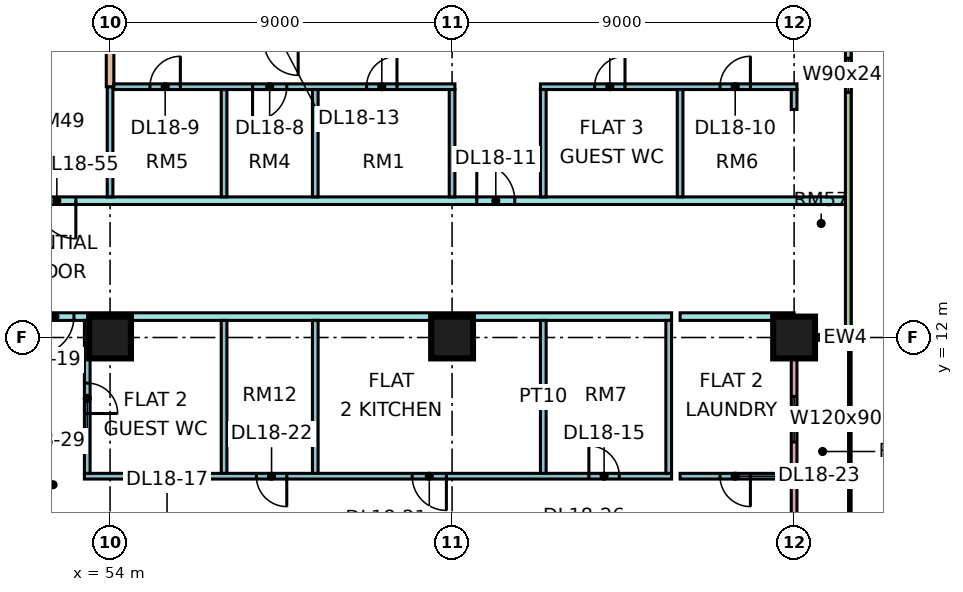
"""IFC4 building model, lengths in metres.
Left out: names, types, materials, properties, quantities, classifications, styles, units other than length and angle.
Written with IfcOpenShell. Run it as: python <this file> out.ifc"""

import sys

from ifc_helpers import new_model, si_unit, direction, frame, frame_2d, origin, origin_2d, place, context, subcontext, project, spatial, rectangle, extrude, element, fill, save


model = new_model("IFC4")
c1 = context("Model", 3, precision=1e-05, world=origin(), true_north=direction((0.0, 1.0)))
c2 = subcontext(c1, "Body", "Model", "MODEL_VIEW")
j1 = project(units=[si_unit("LENGTHUNIT", "METRE"), si_unit("PLANEANGLEUNIT", "RADIAN")], contexts=[c1])
p1 = place(None, origin())
s1 = spatial("IfcSite", under=j1, at=p1, CompositionType="ELEMENT")
p2 = place(p1, origin())
s2 = spatial("IfcBuilding", under=s1, at=p2, CompositionType="ELEMENT")
p3 = place(p2, frame((0.0, 0.0, 82.65)))
s3 = spatial("IfcBuildingStorey", under=s2, at=p3, CompositionType="ELEMENT", Elevation=82.65)
for number, where, z_axis, x_axis in (
    (1, (54.0, 12.0, 0.0), (0.0, 0.0, 1.0), (1.0, 0.0, 0.0)),
    (2, (63.0, 12.0, 0.0), (0.0, 0.0, 1.0), (1.0, 0.0, 0.0)),
    (3, (72.0, 12.0, 0.0), (0.0, 0.0, 1.0), (1.0, 0.0, 0.0)),
):
    element("IfcColumn", number, at=place(p3, frame(where, z_axis=z_axis, x_axis=x_axis)), inside=s3, PredefinedType="COLUMN", context=c2, shape_type="SweptSolid", body=[
        extrude(rectangle(XDim=1.1, YDim=1.1, at=origin_2d()), origin(), (0.0, 0.0, 1.0), 3.75),
    ])
p4 = place(p3, frame((72.0, 1.575, 0.0), z_axis=(0.0, 0.0, 1.0), x_axis=(0.0, 1.0, 0.0)))
e4 = element("IfcWall", 4, at=p4, inside=s3, PredefinedType="SOLIDWALL", context=c2, shape_type="SweptSolid", body=[
    extrude(rectangle(XDim=10.35, YDim=0.15, at=frame_2d((5.175, 0.0))), origin(), (0.0, 0.0, 1.0), 3.3),
])
p5 = place(p4, frame((1.887, 0.0, 0.0)))
e5 = element("IfcOpeningElement", 5, at=p5, cuts=e4, PredefinedType="OPENING", context=c2, shape_type="SweptSolid", body=[
    extrude(rectangle(XDim=1.8, YDim=2.4, at=frame_2d((0.9, 1.2))), frame((0.0, 0.085, 0.0), z_axis=(0.0, -1.0, 0.0), x_axis=(1.0, 0.0, 0.0)), (0.0, 0.0, 1.0), 0.17),
])
p6 = place(p4, frame((7.675, 0.0, 1.7)))
e6 = element("IfcOpeningElement", 6, at=p6, cuts=e4, PredefinedType="OPENING", context=c2, shape_type="SweptSolid", body=[
    extrude(rectangle(XDim=1.2, YDim=0.9, at=frame_2d((0.6, 0.45))), frame((0.0, 0.085, 0.0), z_axis=(0.0, -1.0, 0.0), x_axis=(1.0, 0.0, 0.0)), (0.0, 0.0, 1.0), 0.17),
])
p7 = place(p3, frame((73.5, 12.0, 0.0), z_axis=(0.0, 0.0, 1.0), x_axis=(-1.0, 0.0, 0.0)))
e7 = element("IfcWall", 7, at=p7, inside=s3, PredefinedType="SOLIDWALL", context=c2, shape_type="SweptSolid", body=[
    extrude(rectangle(XDim=1.5, YDim=0.15, at=frame_2d((0.75, 0.0))), origin(), (0.0, 0.0, 1.0), 3.3),
])
p8 = place(p3, frame((73.425, 12.075, 0.0), z_axis=(0.0, 0.0, 1.0), x_axis=(0.0, 1.0, 0.0)))
e8 = element("IfcWall", 8, at=p8, inside=s3, PredefinedType="SOLIDWALL", context=c2, shape_type="SweptSolid", body=[
    extrude(rectangle(XDim=10.425, YDim=0.15, at=frame_2d((5.212, 0.0))), origin(), (0.0, 0.0, 1.0), 3.3),
])
p9 = place(p8, frame((6.375, 0.0, 0.45)))
e9 = element("IfcOpeningElement", 9, at=p9, cuts=e8, PredefinedType="OPENING", context=c2, shape_type="SweptSolid", body=[
    extrude(rectangle(XDim=0.9, YDim=2.4, at=frame_2d((0.45, 1.2))), frame((0.0, 0.085, 0.0), z_axis=(0.0, -1.0, 0.0), x_axis=(1.0, 0.0, 0.0)), (0.0, 0.0, 1.0), 0.17),
])
p10 = place(p8, frame((8.175, 0.0, 0.45)))
e10 = element("IfcOpeningElement", 10, at=p10, cuts=e8, PredefinedType="OPENING", context=c2, shape_type="SweptSolid", body=[
    extrude(rectangle(XDim=1.8, YDim=2.4, at=frame_2d((0.9, 1.2))), frame((0.0, 0.085, 0.0), z_axis=(0.0, -1.0, 0.0), x_axis=(1.0, 0.0, 0.0)), (0.0, 0.0, 1.0), 0.17),
])
p11 = place(p3, frame((40.65, 12.55, 0.0), z_axis=(0.0, 0.0, 1.0), x_axis=(1.0, 0.0, 0.0)))
e11 = element("IfcWall", 11, at=p11, inside=s3, PredefinedType="PARTITIONING", context=c2, shape_type="SweptSolid", body=[
    extrude(rectangle(XDim=28.125, YDim=0.2, at=frame_2d((14.062, 0.0))), origin(), (0.0, 0.0, 1.0), 3.3),
])
p12 = place(p11, frame((11.4, 0.0, 0.0)))
e12 = element("IfcOpeningElement", 12, at=p12, cuts=e11, PredefinedType="OPENING", context=c2, shape_type="SweptSolid", body=[
    extrude(rectangle(XDim=1.0, YDim=2.1, at=frame_2d((0.5, 1.05))), frame((0.0, 0.11, 0.0), z_axis=(0.0, -1.0, 0.0), x_axis=(1.0, 0.0, 0.0)), (0.0, 0.0, 1.0), 0.22),
])
p13 = place(p11, frame((1.05, 0.0, 0.0)))
e13 = element("IfcOpeningElement", 13, at=p13, cuts=e11, PredefinedType="OPENING", context=c2, shape_type="SweptSolid", body=[
    extrude(rectangle(XDim=1.0, YDim=2.1, at=frame_2d((0.5, 1.05))), frame((0.0, 0.11, 0.0), z_axis=(0.0, -1.0, 0.0), x_axis=(1.0, 0.0, 0.0)), (0.0, 0.0, 1.0), 0.22),
])
p14 = place(p3, frame((51.225, 15.6, 0.0), z_axis=(0.0, 0.0, 1.0), x_axis=(1.0, 0.0, 0.0)))
e14 = element("IfcWall", 14, at=p14, inside=s3, PredefinedType="PARTITIONING", context=c2, shape_type="SweptSolid", body=[
    extrude(rectangle(XDim=22.125, YDim=0.2, at=frame_2d((11.062, 0.0))), origin(), (0.0, 0.0, 1.0), 3.3),
])
p15 = place(p14, frame((12.425, 0.0, 0.0)))
e15 = element("IfcOpeningElement", 15, at=p15, cuts=e14, PredefinedType="OPENING", context=c2, shape_type="SweptSolid", body=[
    extrude(rectangle(XDim=1.0, YDim=2.1, at=frame_2d((0.5, 1.05))), frame((0.0, 0.11, 0.0), z_axis=(0.0, -1.0, 0.0), x_axis=(1.0, 0.0, 0.0)), (0.0, 0.0, 1.0), 0.22),
])
p16 = place(p14, frame((0.875, 0.0, 0.0)))
e16 = element("IfcOpeningElement", 16, at=p16, cuts=e14, PredefinedType="OPENING", context=c2, shape_type="SweptSolid", body=[
    extrude(rectangle(XDim=1.0, YDim=2.1, at=frame_2d((0.5, 1.05))), frame((0.0, 0.11, 0.0), z_axis=(0.0, -1.0, 0.0), x_axis=(1.0, 0.0, 0.0)), (0.0, 0.0, 1.0), 0.22),
])
p17 = place(p3, frame((53.325, 8.35, 0.0), z_axis=(0.0, 0.0, 1.0), x_axis=(1.0, 0.0, 0.0)))
e17 = element("IfcWall", 17, at=p17, inside=s3, PredefinedType="PARTITIONING", context=c2, shape_type="SweptSolid", body=[
    extrude(rectangle(XDim=15.45, YDim=0.15, at=frame_2d((7.725, 0.0))), origin(), (0.0, 0.0, 1.0), 3.3),
])
p18 = place(p17, frame((13.275, 0.0, 0.0)))
e18 = element("IfcOpeningElement", 18, at=p18, cuts=e17, PredefinedType="OPENING", context=c2, shape_type="SweptSolid", body=[
    extrude(rectangle(XDim=0.8, YDim=2.1, at=frame_2d((0.4, 1.05))), frame((0.0, 0.085, 0.0), z_axis=(0.0, -1.0, 0.0), x_axis=(1.0, 0.0, 0.0)), (0.0, 0.0, 1.0), 0.17),
])
p19 = place(p17, frame((8.625, 0.0, 0.0)))
e19 = element("IfcOpeningElement", 19, at=p19, cuts=e17, PredefinedType="OPENING", context=c2, shape_type="SweptSolid", body=[
    extrude(rectangle(XDim=0.9, YDim=2.1, at=frame_2d((0.45, 1.05))), frame((0.0, 0.085, 0.0), z_axis=(0.0, -1.0, 0.0), x_axis=(1.0, 0.0, 0.0)), (0.0, 0.0, 1.0), 0.17),
])
p20 = place(p17, frame((4.525, 0.0, 0.0)))
e20 = element("IfcOpeningElement", 20, at=p20, cuts=e17, PredefinedType="OPENING", context=c2, shape_type="SweptSolid", body=[
    extrude(rectangle(XDim=0.8, YDim=2.1, at=frame_2d((0.4, 1.05))), frame((0.0, 0.085, 0.0), z_axis=(0.0, -1.0, 0.0), x_axis=(1.0, 0.0, 0.0)), (0.0, 0.0, 1.0), 0.17),
])
p21 = place(p3, frame((53.4, 8.425, 0.0), z_axis=(0.0, 0.0, 1.0), x_axis=(0.0, 1.0, 0.0)))
e21 = element("IfcWall", 21, at=p21, inside=s3, PredefinedType="PARTITIONING", context=c2, shape_type="SweptSolid", body=[
    extrude(rectangle(XDim=4.025, YDim=0.15, at=frame_2d((2.012, 0.0))), origin(), (0.0, 0.0, 1.0), 3.3),
])
p22 = place(p21, frame((1.575, 0.0, 0.0)))
e22 = element("IfcOpeningElement", 22, at=p22, cuts=e21, PredefinedType="OPENING", context=c2, shape_type="SweptSolid", body=[
    extrude(rectangle(XDim=0.8, YDim=2.1, at=frame_2d((0.4, 1.05))), frame((0.0, 0.085, 0.0), z_axis=(0.0, -1.0, 0.0), x_axis=(1.0, 0.0, 0.0)), (0.0, 0.0, 1.0), 0.17),
])
p23 = place(p3, frame((54.0, 15.7, 0.0), z_axis=(0.0, 0.0, 1.0), x_axis=(0.0, 1.0, 0.0)))
e23 = element("IfcWall", 23, at=p23, inside=s3, PredefinedType="PARTITIONING", context=c2, shape_type="SweptSolid", body=[
    extrude(rectangle(XDim=2.9, YDim=0.15, at=frame_2d((1.45, 0.0))), origin(), (0.0, 0.0, 1.0), 3.3),
])
p24 = place(p3, frame((54.0, 18.6, 0.0), z_axis=(0.0, 0.0, 1.0), x_axis=(0.0, 1.0, 0.0)))
e24 = element("IfcWall", 24, at=p24, inside=s3, PredefinedType="PARTITIONING", context=c2, shape_type="SweptSolid", body=[
    extrude(rectangle(XDim=5.326, YDim=0.2, at=frame_2d((2.663, 0.0))), origin(), (0.0, 0.0, 1.0), 3.3),
])
p25 = place(p3, frame((54.1, 18.6, 0.0), z_axis=(0.0, 0.0, 1.0), x_axis=(1.0, 0.0, 0.0)))
e25 = element("IfcWall", 25, at=p25, inside=s3, PredefinedType="PARTITIONING", context=c2, shape_type="SweptSolid", body=[
    extrude(rectangle(XDim=8.975, YDim=0.15, at=frame_2d((4.487, 0.0))), origin(), (0.0, 0.0, 1.0), 3.3),
])
p26 = place(p25, frame((6.65, 0.0, 0.0)))
e26 = element("IfcOpeningElement", 26, at=p26, cuts=e25, PredefinedType="OPENING", context=c2, shape_type="SweptSolid", body=[
    extrude(rectangle(XDim=0.8, YDim=2.1, at=frame_2d((0.4, 1.05))), frame((0.0, 0.085, 0.0), z_axis=(0.0, -1.0, 0.0), x_axis=(1.0, 0.0, 0.0)), (0.0, 0.0, 1.0), 0.17),
])
p27 = place(p25, frame((3.65, 0.0, 0.0)))
e27 = element("IfcOpeningElement", 27, at=p27, cuts=e25, PredefinedType="OPENING", context=c2, shape_type="SweptSolid", body=[
    extrude(rectangle(XDim=0.9, YDim=2.1, at=frame_2d((0.45, 1.05))), frame((0.0, 0.085, 0.0), z_axis=(0.0, -1.0, 0.0), x_axis=(1.0, 0.0, 0.0)), (0.0, 0.0, 1.0), 0.17),
])
p28 = place(p25, frame((0.95, 0.0, 0.0)))
e28 = element("IfcOpeningElement", 28, at=p28, cuts=e25, PredefinedType="OPENING", context=c2, shape_type="SweptSolid", body=[
    extrude(rectangle(XDim=0.8, YDim=2.1, at=frame_2d((0.4, 1.05))), frame((0.0, 0.085, 0.0), z_axis=(0.0, -1.0, 0.0), x_axis=(1.0, 0.0, 0.0)), (0.0, 0.0, 1.0), 0.17),
])
p29 = place(p3, frame((57.0, 8.425, 0.0), z_axis=(0.0, 0.0, 1.0), x_axis=(0.0, 1.0, 0.0)))
e29 = element("IfcWall", 29, at=p29, inside=s3, PredefinedType="PARTITIONING", context=c2, shape_type="SweptSolid", body=[
    extrude(rectangle(XDim=4.025, YDim=0.15, at=frame_2d((2.012, 0.0))), origin(), (0.0, 0.0, 1.0), 3.3),
])
p30 = place(p3, frame((57.0, 15.7, 0.0), z_axis=(0.0, 0.0, 1.0), x_axis=(0.0, 1.0, 0.0)))
e30 = element("IfcWall", 30, at=p30, inside=s3, PredefinedType="PARTITIONING", context=c2, shape_type="SweptSolid", body=[
    extrude(rectangle(XDim=2.825, YDim=0.15, at=frame_2d((1.413, 0.0))), origin(), (0.0, 0.0, 1.0), 3.3),
])
p31 = place(p3, frame((59.4, 8.425, 0.0), z_axis=(0.0, 0.0, 1.0), x_axis=(0.0, 1.0, 0.0)))
e31 = element("IfcWall", 31, at=p31, inside=s3, PredefinedType="PARTITIONING", context=c2, shape_type="SweptSolid", body=[
    extrude(rectangle(XDim=4.025, YDim=0.15, at=frame_2d((2.012, 0.0))), origin(), (0.0, 0.0, 1.0), 3.3),
])
for number, where, z_axis, x_axis in (
    (32, (59.4, 15.7, 0.0), (0.0, 0.0, 1.0), (0.0, 1.0, 0.0)),
    (33, (63.0, 15.7, 0.0), (0.0, 0.0, 1.0), (0.0, 1.0, 0.0)),
):
    element("IfcWall", number, at=place(p3, frame(where, z_axis=z_axis, x_axis=x_axis)), inside=s3, PredefinedType="PARTITIONING", context=c2, shape_type="SweptSolid", body=[
        extrude(rectangle(XDim=2.825, YDim=0.15, at=frame_2d((1.413, 0.0))), origin(), (0.0, 0.0, 1.0), 3.3),
    ])
p32 = place(p3, frame((65.325, 18.6, 0.0), z_axis=(0.0, 0.0, 1.0), x_axis=(1.0, 0.0, 0.0)))
e34 = element("IfcWall", 34, at=p32, inside=s3, PredefinedType="PARTITIONING", context=c2, shape_type="SweptSolid", body=[
    extrude(rectangle(XDim=6.75, YDim=0.15, at=frame_2d((3.375, 0.0))), origin(), (0.0, 0.0, 1.0), 3.3),
])
p33 = place(p32, frame((4.725, 0.0, 0.0)))
e35 = element("IfcOpeningElement", 35, at=p33, cuts=e34, PredefinedType="OPENING", context=c2, shape_type="SweptSolid", body=[
    extrude(rectangle(XDim=0.8, YDim=2.1, at=frame_2d((0.4, 1.05))), frame((0.0, 0.085, 0.0), z_axis=(0.0, -1.0, 0.0), x_axis=(1.0, 0.0, 0.0)), (0.0, 0.0, 1.0), 0.17),
])
p34 = place(p32, frame((1.425, 0.0, 0.0)))
e36 = element("IfcOpeningElement", 36, at=p34, cuts=e34, PredefinedType="OPENING", context=c2, shape_type="SweptSolid", body=[
    extrude(rectangle(XDim=0.8, YDim=2.1, at=frame_2d((0.4, 1.05))), frame((0.0, 0.085, 0.0), z_axis=(0.0, -1.0, 0.0), x_axis=(1.0, 0.0, 0.0)), (0.0, 0.0, 1.0), 0.17),
])
p35 = place(p3, frame((65.4, 8.425, 0.0), z_axis=(0.0, 0.0, 1.0), x_axis=(0.0, 1.0, 0.0)))
e37 = element("IfcWall", 37, at=p35, inside=s3, PredefinedType="PARTITIONING", context=c2, shape_type="SweptSolid", body=[
    extrude(rectangle(XDim=4.025, YDim=0.15, at=frame_2d((2.012, 0.0))), origin(), (0.0, 0.0, 1.0), 3.3),
])
p36 = place(p3, frame((65.4, 15.7, 0.0), z_axis=(0.0, 0.0, 1.0), x_axis=(0.0, 1.0, 0.0)))
e38 = element("IfcWall", 38, at=p36, inside=s3, PredefinedType="PARTITIONING", context=c2, shape_type="SweptSolid", body=[
    extrude(rectangle(XDim=2.825, YDim=0.15, at=frame_2d((1.413, 0.0))), origin(), (0.0, 0.0, 1.0), 3.3),
])
p37 = place(p3, frame((68.7, 8.425, 0.0), z_axis=(0.0, 0.0, 1.0), x_axis=(0.0, 1.0, 0.0)))
e39 = element("IfcWall", 39, at=p37, inside=s3, PredefinedType="PARTITIONING", context=c2, shape_type="SweptSolid", body=[
    extrude(rectangle(XDim=4.025, YDim=0.15, at=frame_2d((2.012, 0.0))), origin(), (0.0, 0.0, 1.0), 3.3),
])
p38 = place(p3, frame((69.0, 8.35, 0.0), z_axis=(0.0, 0.0, 1.0), x_axis=(1.0, 0.0, 0.0)))
e40 = element("IfcWall", 40, at=p38, inside=s3, PredefinedType="PARTITIONING", context=c2, shape_type="SweptSolid", body=[
    extrude(rectangle(XDim=2.926, YDim=0.15, at=frame_2d((1.463, 0.0))), origin(), (0.0, 0.0, 1.0), 3.3),
])
p39 = place(p38, frame((1.05, 0.0, 0.0)))
e41 = element("IfcOpeningElement", 41, at=p39, cuts=e40, PredefinedType="OPENING", context=c2, shape_type="SweptSolid", body=[
    extrude(rectangle(XDim=0.8, YDim=2.1, at=frame_2d((0.4, 1.05))), frame((0.0, 0.085, 0.0), z_axis=(0.0, -1.0, 0.0), x_axis=(1.0, 0.0, 0.0)), (0.0, 0.0, 1.0), 0.17),
])
p40 = place(p3, frame((69.0, 12.55, 0.0), z_axis=(0.0, 0.0, 1.0), x_axis=(1.0, 0.0, 0.0)))
e42 = element("IfcWall", 42, at=p40, inside=s3, PredefinedType="PARTITIONING", context=c2, shape_type="SweptSolid", body=[
    extrude(rectangle(XDim=3.0, YDim=0.2, at=frame_2d((1.5, 0.0))), origin(), (0.0, 0.0, 1.0), 3.3),
])
p41 = place(p3, frame((69.0, 15.7, 0.0), z_axis=(0.0, 0.0, 1.0), x_axis=(0.0, 1.0, 0.0)))
e43 = element("IfcWall", 43, at=p41, inside=s3, PredefinedType="PARTITIONING", context=c2, shape_type="SweptSolid", body=[
    extrude(rectangle(XDim=2.825, YDim=0.15, at=frame_2d((1.413, 0.0))), origin(), (0.0, 0.0, 1.0), 3.3),
])
p42 = place(p3, frame((72.0, 18.0, 0.0), z_axis=(0.0, 0.0, 1.0), x_axis=(0.0, 1.0, 0.0)))
e44 = element("IfcWall", 44, at=p42, inside=s3, PredefinedType="PARTITIONING", context=c2, shape_type="SweptSolid", body=[
    extrude(rectangle(XDim=0.525, YDim=0.15, at=frame_2d((0.262, 0.0))), origin(), (0.0, 0.0, 1.0), 3.3),
])
p43 = place(p6, origin())
e45 = element("IfcWindow", 45, at=p43, inside=s3, PartitioningType="SINGLE_PANEL", PredefinedType="WINDOW", context=c2, shape_type="SweptSolid", body=[
    extrude(rectangle(XDim=1.2, YDim=0.9, at=frame_2d((0.6, 0.45))), frame((0.0, 0.03, 0.0), z_axis=(0.0, -1.0, 0.0), x_axis=(1.0, 0.0, 0.0)), (0.0, 0.0, 1.0), 0.06),
])
fill(e6, e45)
p44 = place(p9, origin())
e46 = element("IfcWindow", 46, at=p44, inside=s3, PartitioningType="SINGLE_PANEL", PredefinedType="WINDOW", context=c2, shape_type="SweptSolid", body=[
    extrude(rectangle(XDim=0.9, YDim=2.4, at=frame_2d((0.45, 1.2))), frame((0.0, 0.03, 0.0), z_axis=(0.0, -1.0, 0.0), x_axis=(1.0, 0.0, 0.0)), (0.0, 0.0, 1.0), 0.06),
])
fill(e9, e46)
p45 = place(p26, frame((0.8, 0.0, 0.0), z_axis=(0.0, 0.0, 1.0), x_axis=(-1.0, 0.0, 0.0)))
e47 = element("IfcDoor", 47, at=p45, inside=s3, OperationType="SINGLE_SWING_RIGHT", PredefinedType="DOOR", context=c2, shape_type="SweptSolid", body=[
    extrude(rectangle(XDim=0.8, YDim=2.1, at=frame_2d((0.4, 1.05))), frame((0.0, 0.025, 0.0), z_axis=(0.0, -1.0, 0.0), x_axis=(1.0, 0.0, 0.0)), (0.0, 0.0, 1.0), 0.05),
])
fill(e26, e47)
p46 = place(p27, frame((0.9, 0.0, 0.0), z_axis=(0.0, 0.0, 1.0), x_axis=(-1.0, 0.0, 0.0)))
e48 = element("IfcDoor", 48, at=p46, inside=s3, OperationType="SINGLE_SWING_LEFT", PredefinedType="DOOR", context=c2, shape_type="SweptSolid", body=[
    extrude(rectangle(XDim=0.9, YDim=2.1, at=frame_2d((0.45, 1.05))), frame((0.0, 0.025, 0.0), z_axis=(0.0, -1.0, 0.0), x_axis=(1.0, 0.0, 0.0)), (0.0, 0.0, 1.0), 0.05),
])
fill(e27, e48)
p47 = place(p28, frame((0.8, 0.0, 0.0), z_axis=(0.0, 0.0, 1.0), x_axis=(-1.0, 0.0, 0.0)))
e49 = element("IfcDoor", 49, at=p47, inside=s3, OperationType="SINGLE_SWING_RIGHT", PredefinedType="DOOR", context=c2, shape_type="SweptSolid", body=[
    extrude(rectangle(XDim=0.8, YDim=2.1, at=frame_2d((0.4, 1.05))), frame((0.0, 0.025, 0.0), z_axis=(0.0, -1.0, 0.0), x_axis=(1.0, 0.0, 0.0)), (0.0, 0.0, 1.0), 0.05),
])
fill(e28, e49)
p48 = place(p33, frame((0.8, 0.0, 0.0), z_axis=(0.0, 0.0, 1.0), x_axis=(-1.0, 0.0, 0.0)))
e50 = element("IfcDoor", 50, at=p48, inside=s3, OperationType="SINGLE_SWING_RIGHT", PredefinedType="DOOR", context=c2, shape_type="SweptSolid", body=[
    extrude(rectangle(XDim=0.8, YDim=2.1, at=frame_2d((0.4, 1.05))), frame((0.0, 0.025, 0.0), z_axis=(0.0, -1.0, 0.0), x_axis=(1.0, 0.0, 0.0)), (0.0, 0.0, 1.0), 0.05),
])
fill(e35, e50)
p49 = place(p15, origin())
e51 = element("IfcDoor", 51, at=p49, inside=s3, OperationType="SINGLE_SWING_LEFT", PredefinedType="DOOR", context=c2, shape_type="SweptSolid", body=[
    extrude(rectangle(XDim=1.0, YDim=2.1, at=frame_2d((0.5, 1.05))), frame((0.0, 0.025, 0.0), z_axis=(0.0, -1.0, 0.0), x_axis=(1.0, 0.0, 0.0)), (0.0, 0.0, 1.0), 0.05),
])
fill(e15, e51)
p50 = place(p34, frame((0.8, 0.0, 0.0), z_axis=(0.0, 0.0, 1.0), x_axis=(-1.0, 0.0, 0.0)))
e52 = element("IfcDoor", 52, at=p50, inside=s3, OperationType="SINGLE_SWING_RIGHT", PredefinedType="DOOR", context=c2, shape_type="SweptSolid", body=[
    extrude(rectangle(XDim=0.8, YDim=2.1, at=frame_2d((0.4, 1.05))), frame((0.0, 0.025, 0.0), z_axis=(0.0, -1.0, 0.0), x_axis=(1.0, 0.0, 0.0)), (0.0, 0.0, 1.0), 0.05),
])
fill(e36, e52)
p51 = place(p18, origin())
e53 = element("IfcDoor", 53, at=p51, inside=s3, OperationType="SINGLE_SWING_LEFT", PredefinedType="DOOR", context=c2, shape_type="SweptSolid", body=[
    extrude(rectangle(XDim=0.8, YDim=2.1, at=frame_2d((0.4, 1.05))), frame((0.0, 0.025, 0.0), z_axis=(0.0, -1.0, 0.0), x_axis=(1.0, 0.0, 0.0)), (0.0, 0.0, 1.0), 0.05),
])
fill(e18, e53)
p52 = place(p12, frame((1.0, 0.0, 0.0), z_axis=(0.0, 0.0, 1.0), x_axis=(-1.0, 0.0, 0.0)))
e54 = element("IfcDoor", 54, at=p52, inside=s3, OperationType="SINGLE_SWING_LEFT", PredefinedType="DOOR", context=c2, shape_type="SweptSolid", body=[
    extrude(rectangle(XDim=1.0, YDim=2.1, at=frame_2d((0.5, 1.05))), frame((0.0, 0.025, 0.0), z_axis=(0.0, -1.0, 0.0), x_axis=(1.0, 0.0, 0.0)), (0.0, 0.0, 1.0), 0.05),
])
fill(e12, e54)
p53 = place(p19, origin())
e55 = element("IfcDoor", 55, at=p53, inside=s3, OperationType="SINGLE_SWING_RIGHT", PredefinedType="DOOR", context=c2, shape_type="SweptSolid", body=[
    extrude(rectangle(XDim=0.9, YDim=2.1, at=frame_2d((0.45, 1.05))), frame((0.0, 0.025, 0.0), z_axis=(0.0, -1.0, 0.0), x_axis=(1.0, 0.0, 0.0)), (0.0, 0.0, 1.0), 0.05),
])
fill(e19, e55)
p54 = place(p20, origin())
e56 = element("IfcDoor", 56, at=p54, inside=s3, OperationType="SINGLE_SWING_RIGHT", PredefinedType="DOOR", context=c2, shape_type="SweptSolid", body=[
    extrude(rectangle(XDim=0.8, YDim=2.1, at=frame_2d((0.4, 1.05))), frame((0.0, 0.025, 0.0), z_axis=(0.0, -1.0, 0.0), x_axis=(1.0, 0.0, 0.0)), (0.0, 0.0, 1.0), 0.05),
])
fill(e20, e56)
p55 = place(p39, origin())
e57 = element("IfcDoor", 57, at=p55, inside=s3, OperationType="SINGLE_SWING_RIGHT", PredefinedType="DOOR", context=c2, shape_type="SweptSolid", body=[
    extrude(rectangle(XDim=0.8, YDim=2.1, at=frame_2d((0.4, 1.05))), frame((0.0, 0.025, 0.0), z_axis=(0.0, -1.0, 0.0), x_axis=(1.0, 0.0, 0.0)), (0.0, 0.0, 1.0), 0.05),
])
fill(e41, e57)
p56 = place(p22, frame((0.8, 0.0, 0.0), z_axis=(0.0, 0.0, 1.0), x_axis=(-1.0, 0.0, 0.0)))
e58 = element("IfcDoor", 58, at=p56, inside=s3, OperationType="SINGLE_SWING_LEFT", PredefinedType="DOOR", context=c2, shape_type="SweptSolid", body=[
    extrude(rectangle(XDim=0.8, YDim=2.1, at=frame_2d((0.4, 1.05))), frame((0.0, 0.025, 0.0), z_axis=(0.0, -1.0, 0.0), x_axis=(1.0, 0.0, 0.0)), (0.0, 0.0, 1.0), 0.05),
])
fill(e22, e58)
p57 = place(p16, origin())
e59 = element("IfcDoor", 59, at=p57, inside=s3, OperationType="SINGLE_SWING_RIGHT", PredefinedType="DOOR", context=c2, shape_type="SweptSolid", body=[
    extrude(rectangle(XDim=1.0, YDim=2.1, at=frame_2d((0.5, 1.05))), frame((0.0, 0.025, 0.0), z_axis=(0.0, -1.0, 0.0), x_axis=(1.0, 0.0, 0.0)), (0.0, 0.0, 1.0), 0.05),
])
fill(e16, e59)
save(model, sys.argv[1])
